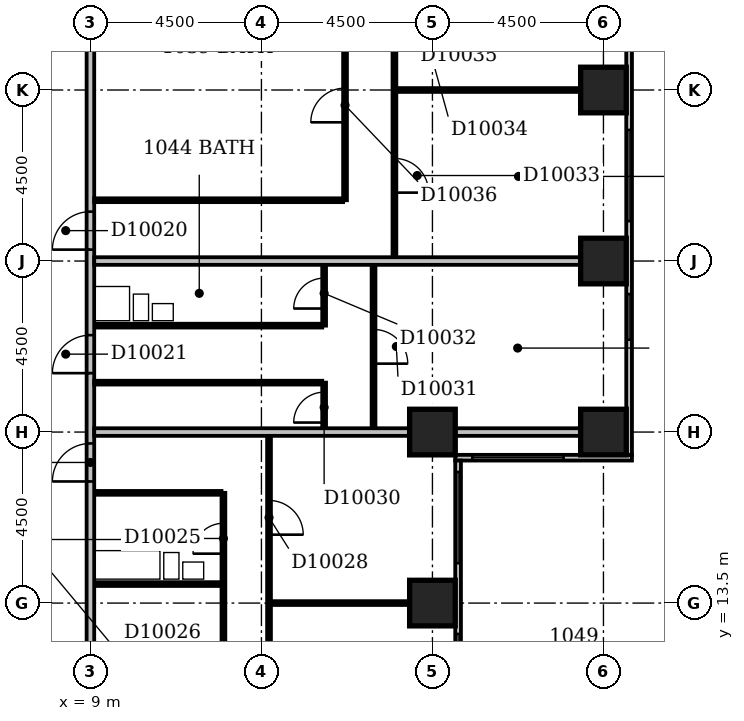
"""IFC4 building model, lengths in metres.
Left out: names, types, materials, properties, quantities, classifications, styles, units other than length and angle.
Written with IfcOpenShell. Run it as: python <this file> out.ifc"""

import sys

from ifc_helpers import new_model, si_unit, direction, frame, frame_2d, origin, origin_2d, place, context, subcontext, project, spatial, rectangle, extrude, element, fill, save


model = new_model("IFC4")
c1 = context("Model", 3, precision=1e-05, world=origin(), true_north=direction((0.0, 1.0)))
c2 = subcontext(c1, "Body", "Model", "MODEL_VIEW")
j1 = project(units=[si_unit("LENGTHUNIT", "METRE"), si_unit("PLANEANGLEUNIT", "RADIAN")], contexts=[c1])
p1 = place(None, origin())
s1 = spatial("IfcSite", under=j1, at=p1, CompositionType="ELEMENT")
p2 = place(p1, origin())
s2 = spatial("IfcBuilding", under=s1, at=p2, CompositionType="ELEMENT")
p3 = place(p2, frame((0.0, 0.0, 47.0)))
s3 = spatial("IfcBuildingStorey", under=s2, at=p3, CompositionType="ELEMENT", Elevation=47.0)
for number, where, z_axis, x_axis in (
    (1, (18.0, 13.5, -0.3), (0.0, 0.0, 1.0), (1.0, 0.0, 0.0)),
    (2, (18.0, 18.0, -0.3), (0.0, 0.0, 1.0), (1.0, 0.0, 0.0)),
    (3, (22.5, 18.0, -0.3), (0.0, 0.0, 1.0), (1.0, 0.0, 0.0)),
    (4, (22.5, 22.5, -0.3), (0.0, 0.0, 1.0), (1.0, 0.0, 0.0)),
    (5, (22.5, 27.0, -0.3), (0.0, 0.0, 1.0), (1.0, 0.0, 0.0)),
):
    element("IfcColumn", number, at=place(p3, frame(where, z_axis=z_axis, x_axis=x_axis)), inside=s3, PredefinedType="COLUMN", context=c2, shape_type="SweptSolid", body=[
        extrude(rectangle(XDim=1.2, YDim=1.2, at=origin_2d()), origin(), (0.0, 0.0, 1.0), 3.6),
    ])
p4 = place(p3, frame((18.675, 8.4, 0.0), z_axis=(0.0, 0.0, 1.0), x_axis=(0.0, 1.0, 0.0)))
e6 = element("IfcWall", 6, at=p4, inside=s3, PredefinedType="STANDARD", context=c2, shape_type="SweptSolid", body=[
    extrude(rectangle(XDim=8.85, YDim=0.15, at=frame_2d((4.425, 0.0))), origin(), (0.0, 0.0, 1.0), 2.7),
])
p5 = place(p4, frame((1.888, 0.0, 0.6)))
e7 = element("IfcOpeningElement", 7, at=p5, cuts=e6, PredefinedType="OPENING", context=c2, shape_type="SweptSolid", body=[
    extrude(rectangle(XDim=2.4, YDim=1.8, at=frame_2d((1.2, 0.9))), frame((0.0, 0.087, 0.0), z_axis=(0.0, -1.0, 0.0), x_axis=(1.0, 0.0, 0.0)), (0.0, 0.0, 1.0), 0.174),
])
p6 = place(p4, frame((6.15, 0.0, 0.6)))
e8 = element("IfcOpeningElement", 8, at=p6, cuts=e6, PredefinedType="OPENING", context=c2, shape_type="SweptSolid", body=[
    extrude(rectangle(XDim=2.4, YDim=1.8, at=frame_2d((1.2, 0.9))), frame((0.0, 0.087, 0.0), z_axis=(0.0, -1.0, 0.0), x_axis=(1.0, 0.0, 0.0)), (0.0, 0.0, 1.0), 0.174),
])
p7 = place(p3, frame((18.6, 17.325, 0.0), z_axis=(0.0, 0.0, 1.0), x_axis=(1.0, 0.0, 0.0)))
e9 = element("IfcWall", 9, at=p7, inside=s3, PredefinedType="STANDARD", context=c2, shape_type="SweptSolid", body=[
    extrude(rectangle(XDim=4.65, YDim=0.15, at=frame_2d((2.325, 0.0))), origin(), (0.0, 0.0, 1.0), 2.7),
])
p8 = place(p7, frame((0.45, 0.0, 0.6)))
e10 = element("IfcOpeningElement", 10, at=p8, cuts=e9, PredefinedType="OPENING", context=c2, shape_type="SweptSolid", body=[
    extrude(rectangle(XDim=2.4, YDim=1.8, at=frame_2d((1.2, 0.9))), frame((0.0, 0.087, 0.0), z_axis=(0.0, -1.0, 0.0), x_axis=(1.0, 0.0, 0.0)), (0.0, 0.0, 1.0), 0.174),
])
p9 = place(p3, frame((23.175, 17.4, 0.0), z_axis=(0.0, 0.0, 1.0), x_axis=(0.0, 1.0, 0.0)))
e11 = element("IfcWall", 11, at=p9, inside=s3, PredefinedType="STANDARD", context=c2, shape_type="SweptSolid", body=[
    extrude(rectangle(XDim=17.85, YDim=0.15, at=frame_2d((8.925, 0.0))), origin(), (0.0, 0.0, 1.0), 2.7),
])
p10 = place(p9, frame((3.03, 0.0, 0.6)))
e12 = element("IfcOpeningElement", 12, at=p10, cuts=e11, PredefinedType="OPENING", context=c2, shape_type="SweptSolid", body=[
    extrude(rectangle(XDim=1.2, YDim=1.8, at=frame_2d((0.6, 0.9))), frame((0.0, 0.087, 0.0), z_axis=(0.0, -1.0, 0.0), x_axis=(1.0, 0.0, 0.0)), (0.0, 0.0, 1.0), 0.174),
])
p11 = place(p9, frame((6.15, 0.0, 0.6)))
e13 = element("IfcOpeningElement", 13, at=p11, cuts=e11, PredefinedType="OPENING", context=c2, shape_type="SweptSolid", body=[
    extrude(rectangle(XDim=2.4, YDim=1.8, at=frame_2d((1.2, 0.9))), frame((0.0, 0.087, 0.0), z_axis=(0.0, -1.0, 0.0), x_axis=(1.0, 0.0, 0.0)), (0.0, 0.0, 1.0), 0.174),
])
p12 = place(p9, frame((10.65, 0.0, 0.6)))
e14 = element("IfcOpeningElement", 14, at=p12, cuts=e11, PredefinedType="OPENING", context=c2, shape_type="SweptSolid", body=[
    extrude(rectangle(XDim=2.4, YDim=1.8, at=frame_2d((1.2, 0.9))), frame((0.0, 0.087, 0.0), z_axis=(0.0, -1.0, 0.0), x_axis=(1.0, 0.0, 0.0)), (0.0, 0.0, 1.0), 0.174),
])
p13 = place(p9, frame((14.992, 0.0, 0.6)))
e15 = element("IfcOpeningElement", 15, at=p13, cuts=e11, PredefinedType="OPENING", context=c2, shape_type="SweptSolid", body=[
    extrude(rectangle(XDim=2.1, YDim=1.8, at=frame_2d((1.05, 0.9))), frame((0.0, 0.087, 0.0), z_axis=(0.0, -1.0, 0.0), x_axis=(1.0, 0.0, 0.0)), (0.0, 0.0, 1.0), 0.174),
])
p14 = place(p3, frame((9.0, 5.0, 0.0), z_axis=(0.0, 0.0, 1.0), x_axis=(0.0, 1.0, 0.0)))
e16 = element("IfcWall", 16, at=p14, inside=s3, PredefinedType="PARTITIONING", context=c2, shape_type="SweptSolid", body=[
    extrude(rectangle(XDim=44.5, YDim=0.2, at=frame_2d((22.25, 0.0))), origin(), (0.0, 0.0, 1.0), 3.3),
])
p15 = place(p14, frame((28.45, 0.0, 0.0)))
e17 = element("IfcOpeningElement", 17, at=p15, cuts=e16, PredefinedType="OPENING", context=c2, shape_type="SweptSolid", body=[
    extrude(rectangle(XDim=1.0, YDim=2.1, at=frame_2d((0.5, 1.05))), frame((0.0, 0.112, 0.0), z_axis=(0.0, -1.0, 0.0), x_axis=(1.0, 0.0, 0.0)), (0.0, 0.0, 1.0), 0.224),
])
p16 = place(p14, frame((17.8, 0.0, 0.0)))
e18 = element("IfcOpeningElement", 18, at=p16, cuts=e16, PredefinedType="OPENING", context=c2, shape_type="SweptSolid", body=[
    extrude(rectangle(XDim=1.0, YDim=2.1, at=frame_2d((0.5, 1.05))), frame((0.0, 0.112, 0.0), z_axis=(0.0, -1.0, 0.0), x_axis=(1.0, 0.0, 0.0)), (0.0, 0.0, 1.0), 0.224),
])
p17 = place(p14, frame((14.55, 0.0, 0.0)))
e19 = element("IfcOpeningElement", 19, at=p17, cuts=e16, PredefinedType="OPENING", context=c2, shape_type="SweptSolid", body=[
    extrude(rectangle(XDim=1.0, YDim=2.1, at=frame_2d((0.5, 1.05))), frame((0.0, 0.112, 0.0), z_axis=(0.0, -1.0, 0.0), x_axis=(1.0, 0.0, 0.0)), (0.0, 0.0, 1.0), 0.224),
])
p18 = place(p14, frame((11.7, 0.0, 0.0)))
e20 = element("IfcOpeningElement", 20, at=p18, cuts=e16, PredefinedType="OPENING", context=c2, shape_type="SweptSolid", body=[
    extrude(rectangle(XDim=1.0, YDim=2.1, at=frame_2d((0.5, 1.05))), frame((0.0, 0.112, 0.0), z_axis=(0.0, -1.0, 0.0), x_axis=(1.0, 0.0, 0.0)), (0.0, 0.0, 1.0), 0.224),
])
p19 = place(p14, frame((35.0, 0.0, 0.0)))
e21 = element("IfcOpeningElement", 21, at=p19, cuts=e16, PredefinedType="OPENING", context=c2, shape_type="SweptSolid", body=[
    extrude(rectangle(XDim=0.9, YDim=2.1, at=frame_2d((0.45, 1.05))), frame((0.0, 0.112, 0.0), z_axis=(0.0, -1.0, 0.0), x_axis=(1.0, 0.0, 0.0)), (0.0, 0.0, 1.0), 0.224),
])
p20 = place(p14, frame((1.5, 0.0, 0.0)))
e22 = element("IfcOpeningElement", 22, at=p20, cuts=e16, PredefinedType="OPENING", context=c2, shape_type="SweptSolid", body=[
    extrude(rectangle(XDim=0.9, YDim=2.1, at=frame_2d((0.45, 1.05))), frame((0.0, 0.112, 0.0), z_axis=(0.0, -1.0, 0.0), x_axis=(1.0, 0.0, 0.0)), (0.0, 0.0, 1.0), 0.224),
])
p21 = place(p3, frame((12.5, 9.1, 0.0), z_axis=(0.0, 0.0, 1.0), x_axis=(0.0, 1.0, 0.0)))
e23 = element("IfcWall", 23, at=p21, inside=s3, PredefinedType="PARTITIONING", context=c2, shape_type="SweptSolid", body=[
    extrude(rectangle(XDim=7.3, YDim=0.1, at=frame_2d((3.65, 0.0))), origin(), (0.0, 0.0, 1.0), 3.3),
])
p22 = place(p21, frame((5.7, 0.0, 0.0)))
e24 = element("IfcOpeningElement", 24, at=p22, cuts=e23, PredefinedType="OPENING", context=c2, shape_type="SweptSolid", body=[
    extrude(rectangle(XDim=0.8, YDim=2.1, at=frame_2d((0.4, 1.05))), frame((0.0, 0.062, 0.0), z_axis=(0.0, -1.0, 0.0), x_axis=(1.0, 0.0, 0.0)), (0.0, 0.0, 1.0), 0.124),
])
p23 = place(p21, frame((1.95, 0.0, 0.0)))
e25 = element("IfcOpeningElement", 25, at=p23, cuts=e23, PredefinedType="OPENING", context=c2, shape_type="SweptSolid", body=[
    extrude(rectangle(XDim=0.9, YDim=2.1, at=frame_2d((0.45, 1.05))), frame((0.0, 0.062, 0.0), z_axis=(0.0, -1.0, 0.0), x_axis=(1.0, 0.0, 0.0)), (0.0, 0.0, 1.0), 0.124),
])
p24 = place(p3, frame((13.7, 9.6, 0.0), z_axis=(0.0, 0.0, 1.0), x_axis=(0.0, 1.0, 0.0)))
e26 = element("IfcWall", 26, at=p24, inside=s3, PredefinedType="PARTITIONING", context=c2, shape_type="SweptSolid", body=[
    extrude(rectangle(XDim=8.3, YDim=0.1, at=frame_2d((4.15, 0.0))), origin(), (0.0, 0.0, 1.0), 3.3),
])
p25 = place(p24, frame((1.2, 0.0, 0.0)))
e27 = element("IfcOpeningElement", 27, at=p25, cuts=e26, PredefinedType="OPENING", context=c2, shape_type="SweptSolid", body=[
    extrude(rectangle(XDim=0.9, YDim=2.1, at=frame_2d((0.45, 1.05))), frame((0.0, 0.062, 0.0), z_axis=(0.0, -1.0, 0.0), x_axis=(1.0, 0.0, 0.0)), (0.0, 0.0, 1.0), 0.124),
])
p26 = place(p24, frame((5.7, 0.0, 0.0)))
e28 = element("IfcOpeningElement", 28, at=p26, cuts=e26, PredefinedType="OPENING", context=c2, shape_type="SweptSolid", body=[
    extrude(rectangle(XDim=0.9, YDim=2.1, at=frame_2d((0.45, 1.05))), frame((0.0, 0.062, 0.0), z_axis=(0.0, -1.0, 0.0), x_axis=(1.0, 0.0, 0.0)), (0.0, 0.0, 1.0), 0.124),
])
p27 = place(p3, frame((13.75, 13.5, 0.0), z_axis=(0.0, 0.0, 1.0), x_axis=(1.0, 0.0, 0.0)))
e29 = element("IfcWall", 29, at=p27, inside=s3, PredefinedType="PARTITIONING", context=c2, shape_type="SweptSolid", body=[
    extrude(rectangle(XDim=3.65, YDim=0.1, at=frame_2d((1.825, 0.0))), origin(), (0.0, 0.0, 1.0), 3.3),
])
for number, where, z_axis, x_axis in (
    (30, (9.1, 14.0, 0.0), (0.0, 0.0, 1.0), (1.0, 0.0, 0.0)),
    (31, (9.1, 16.4, 0.0), (0.0, 0.0, 1.0), (1.0, 0.0, 0.0)),
):
    element("IfcWall", number, at=place(p3, frame(where, z_axis=z_axis, x_axis=x_axis)), inside=s3, PredefinedType="PLUMBINGWALL", context=c2, shape_type="SweptSolid", body=[
        extrude(rectangle(XDim=3.35, YDim=0.1, at=frame_2d((1.675, 0.0))), origin(), (0.0, 0.0, 1.0), 3.3),
    ])
p28 = place(p3, frame((9.1, 18.0, 0.0), z_axis=(0.0, 0.0, 1.0), x_axis=(1.0, 0.0, 0.0)))
e32 = element("IfcWall", 32, at=p28, inside=s3, PredefinedType="PARTITIONING", context=c2, shape_type="SweptSolid", body=[
    extrude(rectangle(XDim=8.3, YDim=0.2, at=frame_2d((4.15, 0.0))), origin(), (0.0, 0.0, 1.0), 2.6),
])
p29 = place(p3, frame((18.6, 18.0, 0.0), z_axis=(0.0, 0.0, 1.0), x_axis=(1.0, 0.0, 0.0)))
e33 = element("IfcWall", 33, at=p29, inside=s3, PredefinedType="PARTITIONING", context=c2, shape_type="SweptSolid", body=[
    extrude(rectangle(XDim=3.3, YDim=0.2, at=frame_2d((1.65, 0.0))), origin(), (0.0, 0.0, 1.0), 2.7),
])
p30 = place(p3, frame((15.15, 18.1, 0.0), z_axis=(0.0, 0.0, 1.0), x_axis=(0.0, 1.0, 0.0)))
e34 = element("IfcWall", 34, at=p30, inside=s3, PredefinedType="PARTITIONING", context=c2, shape_type="SweptSolid", body=[
    extrude(rectangle(XDim=1.2, YDim=0.1, at=frame_2d((0.6, 0.0))), origin(), (0.0, 0.0, 1.0), 3.3),
])
p31 = place(p30, frame((0.15, 0.0, 0.0)))
e35 = element("IfcOpeningElement", 35, at=p31, cuts=e34, PredefinedType="OPENING", context=c2, shape_type="SweptSolid", body=[
    extrude(rectangle(XDim=0.8, YDim=2.1, at=frame_2d((0.4, 1.05))), frame((0.0, 0.062, 0.0), z_axis=(0.0, -1.0, 0.0), x_axis=(1.0, 0.0, 0.0)), (0.0, 0.0, 1.0), 0.124),
])
p32 = place(p3, frame((16.45, 18.1, 0.0), z_axis=(0.0, 0.0, 1.0), x_axis=(0.0, 1.0, 0.0)))
e36 = element("IfcWall", 36, at=p32, inside=s3, PredefinedType="PARTITIONING", context=c2, shape_type="SweptSolid", body=[
    extrude(rectangle(XDim=4.3, YDim=0.1, at=frame_2d((2.15, 0.0))), origin(), (0.0, 0.0, 1.0), 3.3),
])
p33 = place(p32, frame((1.7, 0.0, 0.0)))
e37 = element("IfcOpeningElement", 37, at=p33, cuts=e36, PredefinedType="OPENING", context=c2, shape_type="SweptSolid", body=[
    extrude(rectangle(XDim=0.9, YDim=2.1, at=frame_2d((0.45, 1.05))), frame((0.0, 0.062, 0.0), z_axis=(0.0, -1.0, 0.0), x_axis=(1.0, 0.0, 0.0)), (0.0, 0.0, 1.0), 0.124),
])
p34 = place(p3, frame((9.1, 19.3, 0.0), z_axis=(0.0, 0.0, 1.0), x_axis=(1.0, 0.0, 0.0)))
e38 = element("IfcWall", 38, at=p34, inside=s3, PredefinedType="PARTITIONING", context=c2, shape_type="SweptSolid", body=[
    extrude(rectangle(XDim=6.0, YDim=0.1, at=frame_2d((3.0, 0.0))), origin(), (0.0, 0.0, 1.0), 3.3),
])
p35 = place(p3, frame((9.1, 20.8, 0.0), z_axis=(0.0, 0.0, 1.0), x_axis=(1.0, 0.0, 0.0)))
e39 = element("IfcWall", 39, at=p35, inside=s3, PredefinedType="PLUMBINGWALL", context=c2, shape_type="SweptSolid", body=[
    extrude(rectangle(XDim=6.0, YDim=0.1, at=frame_2d((3.0, 0.0))), origin(), (0.0, 0.0, 1.0), 3.3),
])
p36 = place(p3, frame((15.15, 20.8, 0.0), z_axis=(0.0, 0.0, 1.0), x_axis=(0.0, 1.0, 0.0)))
e40 = element("IfcWall", 40, at=p36, inside=s3, PredefinedType="PARTITIONING", context=c2, shape_type="SweptSolid", body=[
    extrude(rectangle(XDim=1.6, YDim=0.1, at=frame_2d((0.8, 0.0))), origin(), (0.0, 0.0, 1.0), 3.3),
])
p37 = place(p36, frame((0.45, 0.0, 0.0)))
e41 = element("IfcOpeningElement", 41, at=p37, cuts=e40, PredefinedType="OPENING", context=c2, shape_type="SweptSolid", body=[
    extrude(rectangle(XDim=0.8, YDim=2.1, at=frame_2d((0.4, 1.05))), frame((0.0, 0.062, 0.0), z_axis=(0.0, -1.0, 0.0), x_axis=(1.0, 0.0, 0.0)), (0.0, 0.0, 1.0), 0.124),
])
p38 = place(p3, frame((9.1, 22.5, 0.0), z_axis=(0.0, 0.0, 1.0), x_axis=(1.0, 0.0, 0.0)))
e42 = element("IfcWall", 42, at=p38, inside=s3, PredefinedType="PARTITIONING", context=c2, shape_type="SweptSolid", body=[
    extrude(rectangle(XDim=12.8, YDim=0.2, at=frame_2d((6.4, 0.0))), origin(), (0.0, 0.0, 1.0), 3.3),
])
p39 = place(p3, frame((17.0, 22.6, 0.0), z_axis=(0.0, 0.0, 1.0), x_axis=(0.0, 1.0, 0.0)))
e43 = element("IfcWall", 43, at=p39, inside=s3, PredefinedType="PARTITIONING", context=c2, shape_type="SweptSolid", body=[
    extrude(rectangle(XDim=8.8, YDim=0.1, at=frame_2d((4.4, 0.0))), origin(), (0.0, 0.0, 1.0), 3.3),
])
p40 = place(p39, frame((1.7, 0.0, 0.0)))
e44 = element("IfcOpeningElement", 44, at=p40, cuts=e43, PredefinedType="OPENING", context=c2, shape_type="SweptSolid", body=[
    extrude(rectangle(XDim=0.9, YDim=2.1, at=frame_2d((0.45, 1.05))), frame((0.0, 0.062, 0.0), z_axis=(0.0, -1.0, 0.0), x_axis=(1.0, 0.0, 0.0)), (0.0, 0.0, 1.0), 0.124),
])
p41 = place(p39, frame((6.2, 0.0, 0.0)))
e45 = element("IfcOpeningElement", 45, at=p41, cuts=e43, PredefinedType="OPENING", context=c2, shape_type="SweptSolid", body=[
    extrude(rectangle(XDim=0.9, YDim=2.1, at=frame_2d((0.45, 1.05))), frame((0.0, 0.062, 0.0), z_axis=(0.0, -1.0, 0.0), x_axis=(1.0, 0.0, 0.0)), (0.0, 0.0, 1.0), 0.124),
])
p42 = place(p3, frame((9.1, 24.1, 0.0), z_axis=(0.0, 0.0, 1.0), x_axis=(1.0, 0.0, 0.0)))
e46 = element("IfcWall", 46, at=p42, inside=s3, PredefinedType="PARTITIONING", context=c2, shape_type="SweptSolid", body=[
    extrude(rectangle(XDim=6.55, YDim=0.1, at=frame_2d((3.275, 0.0))), origin(), (0.0, 0.0, 1.0), 3.3),
])
p43 = place(p3, frame((15.7, 24.1, 0.0), z_axis=(0.0, 0.0, 1.0), x_axis=(0.0, 1.0, 0.0)))
e47 = element("IfcWall", 47, at=p43, inside=s3, PredefinedType="PARTITIONING", context=c2, shape_type="SweptSolid", body=[
    extrude(rectangle(XDim=7.3, YDim=0.1, at=frame_2d((3.65, 0.0))), origin(), (0.0, 0.0, 1.0), 3.3),
])
p44 = place(p43, frame((5.8, 0.0, 0.0)))
e48 = element("IfcOpeningElement", 48, at=p44, cuts=e47, PredefinedType="OPENING", context=c2, shape_type="SweptSolid", body=[
    extrude(rectangle(XDim=0.8, YDim=2.1, at=frame_2d((0.4, 1.05))), frame((0.0, 0.062, 0.0), z_axis=(0.0, -1.0, 0.0), x_axis=(1.0, 0.0, 0.0)), (0.0, 0.0, 1.0), 0.124),
])
p45 = place(p43, frame((2.05, 0.0, 0.0)))
e49 = element("IfcOpeningElement", 49, at=p45, cuts=e47, PredefinedType="OPENING", context=c2, shape_type="SweptSolid", body=[
    extrude(rectangle(XDim=0.9, YDim=2.1, at=frame_2d((0.45, 1.05))), frame((0.0, 0.062, 0.0), z_axis=(0.0, -1.0, 0.0), x_axis=(1.0, 0.0, 0.0)), (0.0, 0.0, 1.0), 0.124),
])
p46 = place(p3, frame((17.05, 27.0, 0.0), z_axis=(0.0, 0.0, 1.0), x_axis=(1.0, 0.0, 0.0)))
e50 = element("IfcWall", 50, at=p46, inside=s3, PredefinedType="PARTITIONING", context=c2, shape_type="SweptSolid", body=[
    extrude(rectangle(XDim=4.85, YDim=0.1, at=frame_2d((2.425, 0.0))), origin(), (0.0, 0.0, 1.0), 2.7),
])
p47 = place(p5, origin())
e51 = element("IfcWindow", 51, at=p47, inside=s3, PartitioningType="SINGLE_PANEL", PredefinedType="WINDOW", context=c2, shape_type="SweptSolid", body=[
    extrude(rectangle(XDim=2.4, YDim=1.8, at=frame_2d((1.2, 0.9))), frame((0.0, 0.03, 0.0), z_axis=(0.0, -1.0, 0.0), x_axis=(1.0, 0.0, 0.0)), (0.0, 0.0, 1.0), 0.06),
])
fill(e7, e51)
p48 = place(p6, origin())
e52 = element("IfcWindow", 52, at=p48, inside=s3, PartitioningType="SINGLE_PANEL", PredefinedType="WINDOW", context=c2, shape_type="SweptSolid", body=[
    extrude(rectangle(XDim=2.4, YDim=1.8, at=frame_2d((1.2, 0.9))), frame((0.0, 0.03, 0.0), z_axis=(0.0, -1.0, 0.0), x_axis=(1.0, 0.0, 0.0)), (0.0, 0.0, 1.0), 0.06),
])
fill(e8, e52)
p49 = place(p8, origin())
e53 = element("IfcWindow", 53, at=p49, inside=s3, PartitioningType="SINGLE_PANEL", PredefinedType="WINDOW", context=c2, shape_type="SweptSolid", body=[
    extrude(rectangle(XDim=2.4, YDim=1.8, at=frame_2d((1.2, 0.9))), frame((0.0, 0.03, 0.0), z_axis=(0.0, -1.0, 0.0), x_axis=(1.0, 0.0, 0.0)), (0.0, 0.0, 1.0), 0.06),
])
fill(e10, e53)
p50 = place(p10, origin())
e54 = element("IfcWindow", 54, at=p50, inside=s3, PartitioningType="SINGLE_PANEL", PredefinedType="WINDOW", context=c2, shape_type="SweptSolid", body=[
    extrude(rectangle(XDim=1.2, YDim=1.8, at=frame_2d((0.6, 0.9))), frame((0.0, 0.03, 0.0), z_axis=(0.0, -1.0, 0.0), x_axis=(1.0, 0.0, 0.0)), (0.0, 0.0, 1.0), 0.06),
])
fill(e12, e54)
p51 = place(p11, origin())
e55 = element("IfcWindow", 55, at=p51, inside=s3, PartitioningType="SINGLE_PANEL", PredefinedType="WINDOW", context=c2, shape_type="SweptSolid", body=[
    extrude(rectangle(XDim=2.4, YDim=1.8, at=frame_2d((1.2, 0.9))), frame((0.0, 0.03, 0.0), z_axis=(0.0, -1.0, 0.0), x_axis=(1.0, 0.0, 0.0)), (0.0, 0.0, 1.0), 0.06),
])
fill(e13, e55)
p52 = place(p16, origin())
e56 = element("IfcDoor", 56, at=p52, inside=s3, OperationType="SINGLE_SWING_LEFT", PredefinedType="DOOR", context=c2, shape_type="SweptSolid", body=[
    extrude(rectangle(XDim=1.0, YDim=2.1, at=frame_2d((0.5, 1.05))), frame((0.0, 0.025, 0.0), z_axis=(0.0, -1.0, 0.0), x_axis=(1.0, 0.0, 0.0)), (0.0, 0.0, 1.0), 0.05),
])
fill(e18, e56)
p53 = place(p17, origin())
e57 = element("IfcDoor", 57, at=p53, inside=s3, OperationType="SINGLE_SWING_LEFT", PredefinedType="DOOR", context=c2, shape_type="SweptSolid", body=[
    extrude(rectangle(XDim=1.0, YDim=2.1, at=frame_2d((0.5, 1.05))), frame((0.0, 0.025, 0.0), z_axis=(0.0, -1.0, 0.0), x_axis=(1.0, 0.0, 0.0)), (0.0, 0.0, 1.0), 0.05),
])
fill(e19, e57)
p54 = place(p18, origin())
e58 = element("IfcDoor", 58, at=p54, inside=s3, OperationType="SINGLE_SWING_LEFT", PredefinedType="DOOR", context=c2, shape_type="SweptSolid", body=[
    extrude(rectangle(XDim=1.0, YDim=2.1, at=frame_2d((0.5, 1.05))), frame((0.0, 0.025, 0.0), z_axis=(0.0, -1.0, 0.0), x_axis=(1.0, 0.0, 0.0)), (0.0, 0.0, 1.0), 0.05),
])
fill(e20, e58)
p55 = place(p22, origin())
e59 = element("IfcDoor", 59, at=p55, inside=s3, OperationType="SINGLE_SWING_LEFT", PredefinedType="DOOR", context=c2, shape_type="SweptSolid", body=[
    extrude(rectangle(XDim=0.8, YDim=2.1, at=frame_2d((0.4, 1.05))), frame((0.0, 0.025, 0.0), z_axis=(0.0, -1.0, 0.0), x_axis=(1.0, 0.0, 0.0)), (0.0, 0.0, 1.0), 0.05),
])
fill(e24, e59)
p56 = place(p26, frame((0.9, 0.0, 0.0), z_axis=(0.0, 0.0, 1.0), x_axis=(-1.0, 0.0, 0.0)))
e60 = element("IfcDoor", 60, at=p56, inside=s3, OperationType="SINGLE_SWING_RIGHT", PredefinedType="DOOR", context=c2, shape_type="SweptSolid", body=[
    extrude(rectangle(XDim=0.9, YDim=2.1, at=frame_2d((0.45, 1.05))), frame((0.0, 0.025, 0.0), z_axis=(0.0, -1.0, 0.0), x_axis=(1.0, 0.0, 0.0)), (0.0, 0.0, 1.0), 0.05),
])
fill(e28, e60)
p57 = place(p31, origin())
e61 = element("IfcDoor", 61, at=p57, inside=s3, OperationType="SINGLE_SWING_LEFT", PredefinedType="DOOR", context=c2, shape_type="SweptSolid", body=[
    extrude(rectangle(XDim=0.8, YDim=2.1, at=frame_2d((0.4, 1.05))), frame((0.0, 0.025, 0.0), z_axis=(0.0, -1.0, 0.0), x_axis=(1.0, 0.0, 0.0)), (0.0, 0.0, 1.0), 0.05),
])
fill(e35, e61)
p58 = place(p33, frame((0.9, 0.0, 0.0), z_axis=(0.0, 0.0, 1.0), x_axis=(-1.0, 0.0, 0.0)))
e62 = element("IfcDoor", 62, at=p58, inside=s3, OperationType="SINGLE_SWING_RIGHT", PredefinedType="DOOR", context=c2, shape_type="SweptSolid", body=[
    extrude(rectangle(XDim=0.9, YDim=2.1, at=frame_2d((0.45, 1.05))), frame((0.0, 0.025, 0.0), z_axis=(0.0, -1.0, 0.0), x_axis=(1.0, 0.0, 0.0)), (0.0, 0.0, 1.0), 0.05),
])
fill(e37, e62)
p59 = place(p37, origin())
e63 = element("IfcDoor", 63, at=p59, inside=s3, OperationType="SINGLE_SWING_LEFT", PredefinedType="DOOR", context=c2, shape_type="SweptSolid", body=[
    extrude(rectangle(XDim=0.8, YDim=2.1, at=frame_2d((0.4, 1.05))), frame((0.0, 0.025, 0.0), z_axis=(0.0, -1.0, 0.0), x_axis=(1.0, 0.0, 0.0)), (0.0, 0.0, 1.0), 0.05),
])
fill(e41, e63)
p60 = place(p40, frame((0.9, 0.0, 0.0), z_axis=(0.0, 0.0, 1.0), x_axis=(-1.0, 0.0, 0.0)))
e64 = element("IfcDoor", 64, at=p60, inside=s3, OperationType="SINGLE_SWING_RIGHT", PredefinedType="DOOR", context=c2, shape_type="SweptSolid", body=[
    extrude(rectangle(XDim=0.9, YDim=2.1, at=frame_2d((0.45, 1.05))), frame((0.0, 0.025, 0.0), z_axis=(0.0, -1.0, 0.0), x_axis=(1.0, 0.0, 0.0)), (0.0, 0.0, 1.0), 0.05),
])
fill(e44, e64)
p61 = place(p45, origin())
e65 = element("IfcDoor", 65, at=p61, inside=s3, OperationType="SINGLE_SWING_LEFT", PredefinedType="DOOR", context=c2, shape_type="SweptSolid", body=[
    extrude(rectangle(XDim=0.9, YDim=2.1, at=frame_2d((0.45, 1.05))), frame((0.0, 0.025, 0.0), z_axis=(0.0, -1.0, 0.0), x_axis=(1.0, 0.0, 0.0)), (0.0, 0.0, 1.0), 0.05),
])
fill(e49, e65)
save(model, sys.argv[1])
